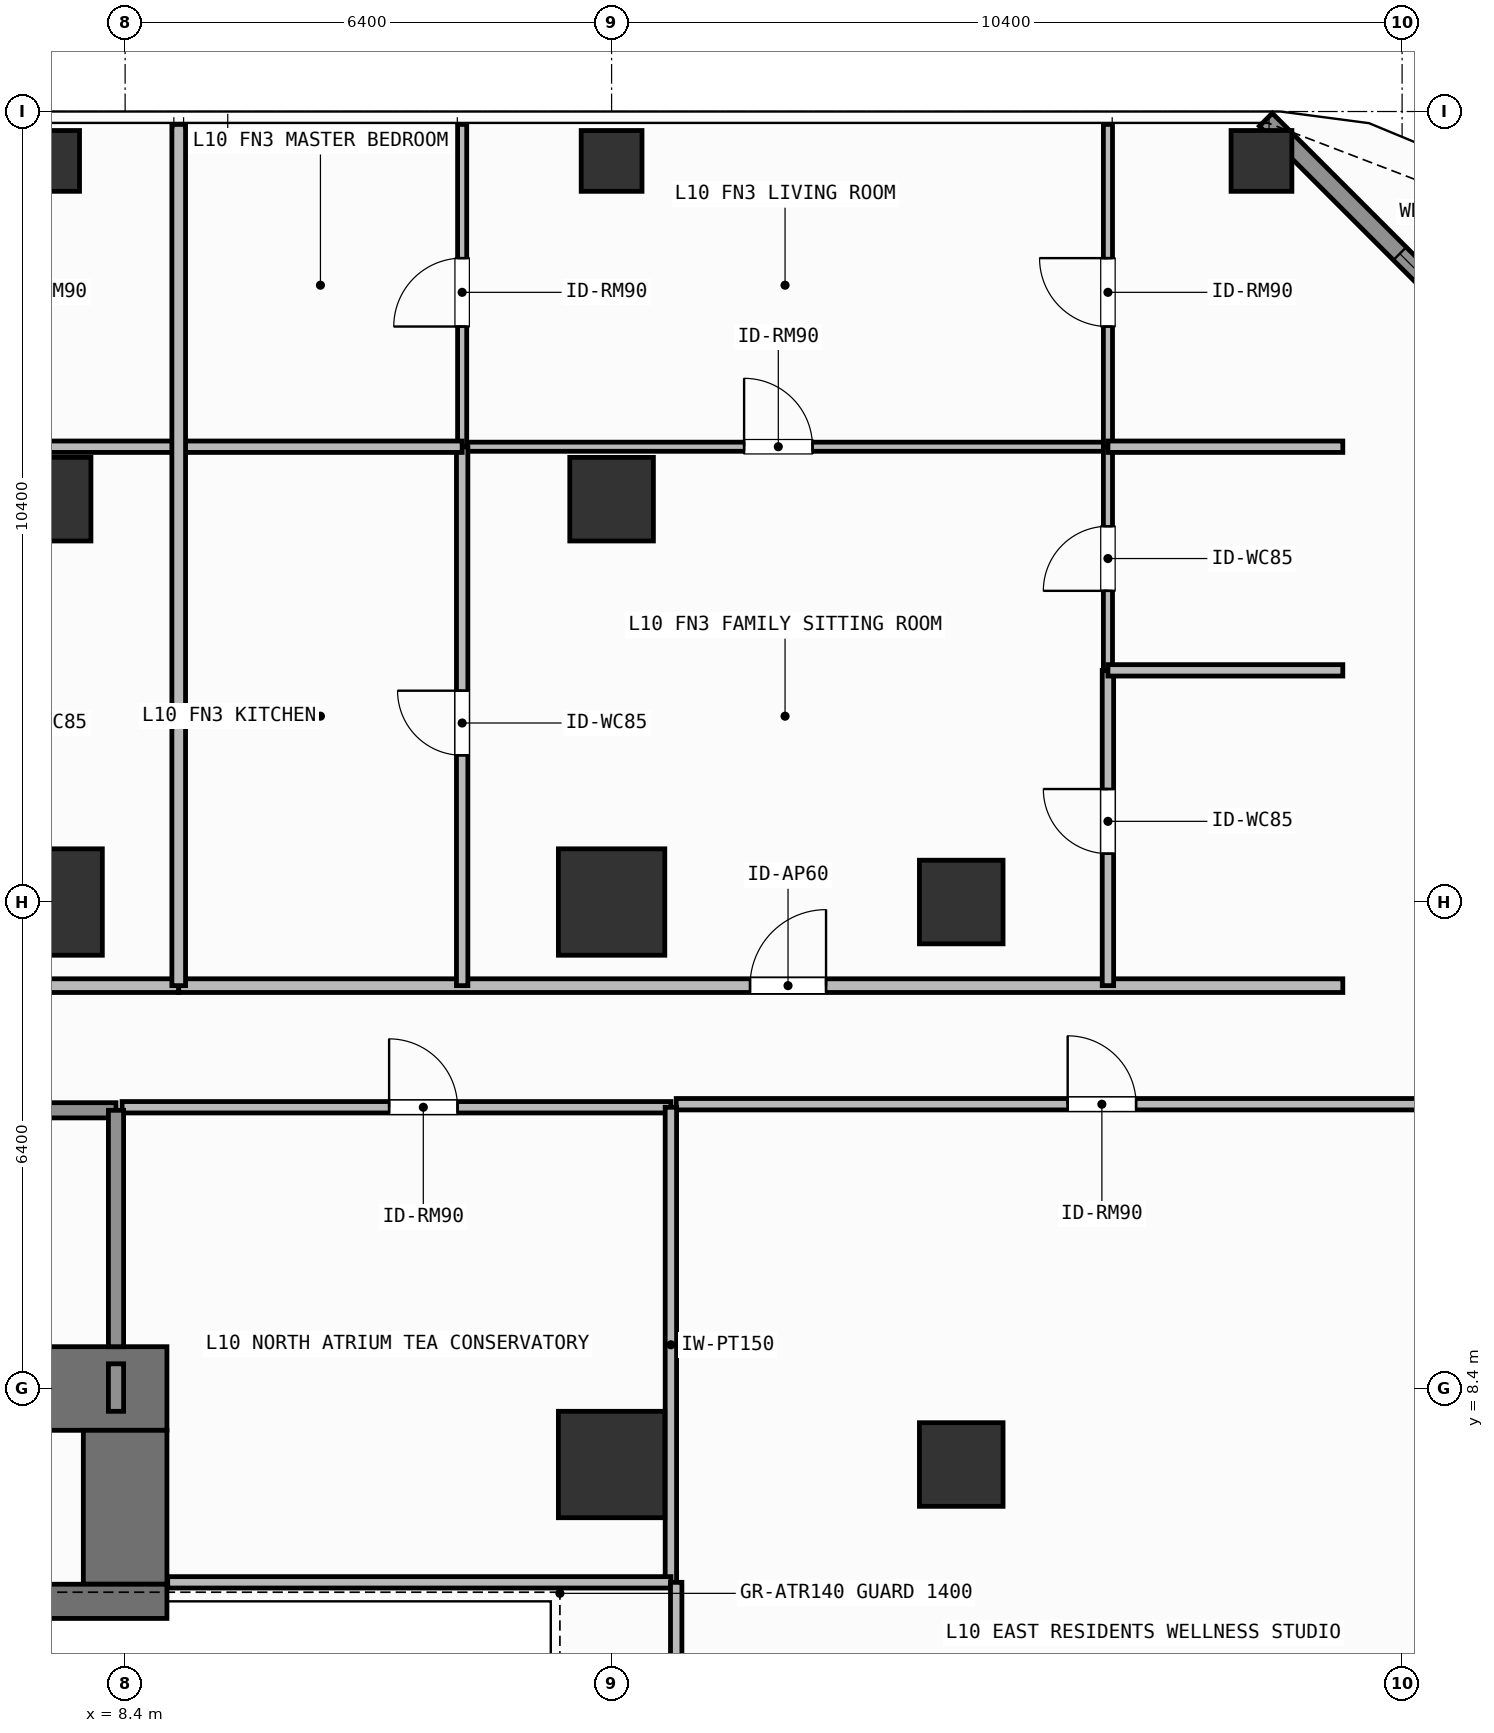
"""IFC4 building model, lengths in metres.
Left out: names, types, materials, properties, quantities, classifications, styles, units other than length and angle.
Written with IfcOpenShell. Run it as: python <this file> out.ifc"""

import sys

from ifc_helpers import new_model, si_unit, direction, frame, frame_2d, origin, origin_2d, place, context, subcontext, project, spatial, rectangle, hollow_rectangle, extrude, element, fill, save


model = new_model("IFC4")
c1 = context("Model", 3, precision=1e-05, world=origin(), true_north=direction((0.0, 1.0)))
c2 = subcontext(c1, "Body", "Model", "MODEL_VIEW")
j1 = project(units=[si_unit("LENGTHUNIT", "METRE"), si_unit("PLANEANGLEUNIT", "RADIAN")], contexts=[c1])
p1 = place(None, origin())
s1 = spatial("IfcSite", under=j1, at=p1, CompositionType="ELEMENT")
p2 = place(p1, origin())
s2 = spatial("IfcBuilding", under=s1, at=p2, CompositionType="ELEMENT")
p3 = place(p2, frame((0.0, 0.0, 38.4)))
s3 = spatial("IfcBuildingStorey", under=s2, at=p3, CompositionType="ELEMENT", Elevation=38.4)
p4 = place(p3, frame((-7.55, 8.4, 0.0), z_axis=(0.0, 0.0, 1.0), x_axis=(1.0, 0.0, 0.0)))
e1 = element("IfcWall", 1, at=p4, inside=s3, PredefinedType="SHEAR", context=c2, shape_type="SweptSolid", body=[
    extrude(rectangle(XDim=16.5, YDim=1.1, at=frame_2d((8.25, 0.0))), origin(), (0.0, 0.0, 1.0), 3.9),
])
p5 = place(p3, frame((8.4, 5.825, 0.0), z_axis=(0.0, 0.0, 1.0), x_axis=(0.0, 1.0, 0.0)))
e2 = element("IfcWall", 2, at=p5, inside=s3, PredefinedType="SHEAR", context=c2, shape_type="SweptSolid", body=[
    extrude(rectangle(XDim=2.025, YDim=1.1, at=frame_2d((1.013, 0.0))), origin(), (0.0, 0.0, 1.0), 3.9),
])
p6 = place(p3, frame((3.045, 5.6, 0.0), z_axis=(0.0, 0.0, 1.0), x_axis=(1.0, 0.0, 0.0)))
e3 = element("IfcWall", 3, at=p6, inside=s3, PredefinedType="SHEAR", context=c2, shape_type="SweptSolid", body=[
    extrude(rectangle(XDim=5.905, YDim=0.45, at=frame_2d((2.953, 0.0))), origin(), (0.0, 0.0, 1.0), 3.9),
])
for number, where, z_axis, x_axis in (
    (4, (7.4, 14.8, 0.0), (0.0, 0.0, 1.0), (1.0, 0.0, 0.0)),
    (5, (14.8, 14.8, 0.0), (0.0, 0.0, 1.0), (1.0, 0.0, 0.0)),
    (6, (14.8, 7.4, 0.0), (0.0, 0.0, 1.0), (1.0, 0.0, 0.0)),
):
    element("IfcColumn", number, at=place(p3, frame(where, z_axis=z_axis, x_axis=x_axis)), inside=s3, PredefinedType="COLUMN", context=c2, shape_type="SweptSolid", body=[
        extrude(rectangle(XDim=1.4, YDim=1.4, at=origin_2d()), origin(), (0.0, 0.0, 1.0), 3.9),
    ])
for number, where, z_axis, x_axis in (
    (7, (19.4, 7.4, 0.0), (0.0, 0.0, 1.0), (1.0, 0.0, 0.0)),
    (8, (19.4, 14.8, 0.0), (0.0, 0.0, 1.0), (1.0, 0.0, 0.0)),
    (9, (7.4, 20.1, 0.0), (0.0, 0.0, 1.0), (1.0, 0.0, 0.0)),
    (10, (14.8, 20.1, 0.0), (0.0, 0.0, 1.0), (1.0, 0.0, 0.0)),
):
    element("IfcColumn", number, at=place(p3, frame(where, z_axis=z_axis, x_axis=x_axis)), inside=s3, PredefinedType="COLUMN", context=c2, shape_type="SweptSolid", body=[
        extrude(rectangle(XDim=1.1, YDim=1.1, at=origin_2d()), origin(), (0.0, 0.0, 1.0), 3.9),
    ])
for number, where, z_axis, x_axis in (
    (11, (23.35, 24.55, 0.0), (0.0, 0.0, 1.0), (1.0, 0.0, 0.0)),
    (12, (7.4, 24.55, 0.0), (0.0, 0.0, 1.0), (1.0, 0.0, 0.0)),
    (13, (14.8, 24.55, 0.0), (0.0, 0.0, 1.0), (1.0, 0.0, 0.0)),
):
    element("IfcColumn", number, at=place(p3, frame(where, z_axis=z_axis, x_axis=x_axis)), inside=s3, PredefinedType="COLUMN", context=c2, shape_type="SweptSolid", body=[
        extrude(hollow_rectangle(XDim=0.8, YDim=0.8, WallThickness=0.036, at=origin_2d()), origin(), (0.0, 0.0, 1.0), 3.9),
    ])
p7 = place(p3, frame((23.408, 25.092, 0.0), z_axis=(0.0, 0.0, 1.0), x_axis=(0.707106781187, -0.707106781187, 0.0)))
e14 = element("IfcWall", 14, at=p7, inside=s3, PredefinedType="SOLIDWALL", context=c2, shape_type="SweptSolid", body=[
    extrude(rectangle(XDim=6.484, YDim=0.24, at=frame_2d((3.242, 0.0))), origin(), (0.0, 0.0, 1.0), 3.68),
])
p8 = place(p7, frame((2.492, 0.0, 0.8)))
e15 = element("IfcOpeningElement", 15, at=p8, cuts=e14, PredefinedType="OPENING", context=c2, shape_type="SweptSolid", body=[
    extrude(rectangle(XDim=1.5, YDim=1.85, at=frame_2d((0.75, 0.925))), frame((0.0, 0.13, 0.0), z_axis=(0.0, -1.0, 0.0), x_axis=(1.0, 0.0, 0.0)), (0.0, 0.0, 1.0), 0.26),
])
p9 = place(p3, frame((4.58, 12.06, 0.0), z_axis=(0.0, 0.0, 1.0), x_axis=(1.0, 0.0, 0.0)))
e16 = element("IfcWall", 16, at=p9, inside=s3, PredefinedType="SOLIDWALL", context=c2, shape_type="SweptSolid", body=[
    extrude(rectangle(XDim=3.7, YDim=0.2, at=frame_2d((1.85, 0.0))), origin(), (0.0, 0.0, 1.0), 3.68),
])
p10 = place(p9, frame((1.212, 0.0, 0.0)))
e17 = element("IfcOpeningElement", 17, at=p10, cuts=e16, PredefinedType="OPENING", context=c2, shape_type="SweptSolid", body=[
    extrude(rectangle(XDim=1.1, YDim=2.15, at=frame_2d((0.55, 1.075))), frame((0.0, 0.11, 0.0), z_axis=(0.0, -1.0, 0.0), x_axis=(1.0, 0.0, 0.0)), (0.0, 0.0, 1.0), 0.22),
])
p11 = place(p3, frame((8.36, 12.1, 0.0), z_axis=(0.0, 0.0, 1.0), x_axis=(1.0, 0.0, 0.0)))
e18 = element("IfcWall", 18, at=p11, inside=s3, PredefinedType="PARTITIONING", context=c2, shape_type="SweptSolid", body=[
    extrude(rectangle(XDim=7.22, YDim=0.15, at=frame_2d((3.61, 0.0))), origin(), (0.0, 0.0, 1.0), 3.68),
])
p12 = place(p11, frame((3.513, 0.0, 0.0)))
e19 = element("IfcOpeningElement", 19, at=p12, cuts=e18, PredefinedType="OPENING", context=c2, shape_type="SweptSolid", body=[
    extrude(rectangle(XDim=0.9, YDim=2.1, at=frame_2d((0.45, 1.05))), frame((0.0, 0.085, 0.0), z_axis=(0.0, -1.0, 0.0), x_axis=(1.0, 0.0, 0.0)), (0.0, 0.0, 1.0), 0.17),
])
p13 = place(p3, frame((-2.121, 13.7, 0.0), z_axis=(0.0, 0.0, 1.0), x_axis=(1.0, 0.0, 0.0)))
e20 = element("IfcWall", 20, at=p13, inside=s3, PredefinedType="PARTITIONING", context=c2, shape_type="SweptSolid", body=[
    extrude(rectangle(XDim=11.226, YDim=0.18, at=frame_2d((5.613, 0.0))), origin(), (0.0, 0.0, 1.0), 3.68),
])
p14 = place(p13, frame((5.29, 0.0, 0.0)))
e21 = element("IfcOpeningElement", 21, at=p14, cuts=e20, PredefinedType="OPENING", context=c2, shape_type="SweptSolid", body=[
    extrude(rectangle(XDim=1.0, YDim=2.2, at=frame_2d((0.5, 1.1))), frame((0.0, 0.1, 0.0), z_axis=(0.0, -1.0, 0.0), x_axis=(1.0, 0.0, 0.0)), (0.0, 0.0, 1.0), 0.2),
])
p15 = place(p3, frame((9.105, 13.7, 0.0), z_axis=(0.0, 0.0, 1.0), x_axis=(1.0, 0.0, 0.0)))
e22 = element("IfcWall", 22, at=p15, inside=s3, PredefinedType="PARTITIONING", context=c2, shape_type="SweptSolid", body=[
    extrude(rectangle(XDim=15.315, YDim=0.18, at=frame_2d((7.657, 0.0))), origin(), (0.0, 0.0, 1.0), 3.68),
])
p16 = place(p15, frame((7.516, 0.0, 0.0)))
e23 = element("IfcOpeningElement", 23, at=p16, cuts=e22, PredefinedType="OPENING", context=c2, shape_type="SweptSolid", body=[
    extrude(rectangle(XDim=1.0, YDim=2.2, at=frame_2d((0.5, 1.1))), frame((0.0, 0.1, 0.0), z_axis=(0.0, -1.0, 0.0), x_axis=(1.0, 0.0, 0.0)), (0.0, 0.0, 1.0), 0.2),
])
p17 = place(p3, frame((12.834, 20.79, 0.0), z_axis=(0.0, 0.0, 1.0), x_axis=(1.0, 0.0, 0.0)))
e24 = element("IfcWall", 24, at=p17, inside=s3, PredefinedType="PARTITIONING", context=c2, shape_type="SweptSolid", body=[
    extrude(rectangle(XDim=8.496, YDim=0.12, at=frame_2d((4.248, 0.0))), origin(), (0.0, 0.0, 1.0), 3.68),
])
p18 = place(p17, frame((3.709, 0.0, 0.0)))
e25 = element("IfcOpeningElement", 25, at=p18, cuts=e24, PredefinedType="OPENING", context=c2, shape_type="SweptSolid", body=[
    extrude(rectangle(XDim=0.9, YDim=2.1, at=frame_2d((0.45, 1.05))), frame((0.0, 0.07, 0.0), z_axis=(0.0, -1.0, 0.0), x_axis=(1.0, 0.0, 0.0)), (0.0, 0.0, 1.0), 0.14),
])
p19 = place(p3, frame((12.834, 13.7, 0.0), z_axis=(0.0, 0.0, 1.0), x_axis=(0.0, 1.0, 0.0)))
e26 = element("IfcWall", 26, at=p19, inside=s3, PredefinedType="PARTITIONING", context=c2, shape_type="SweptSolid", body=[
    extrude(rectangle(XDim=7.09, YDim=0.15, at=frame_2d((3.545, 0.0))), origin(), (0.0, 0.0, 1.0), 3.68),
])
p20 = place(p19, frame((3.03, 0.0, 0.0)))
e27 = element("IfcOpeningElement", 27, at=p20, cuts=e26, PredefinedType="OPENING", context=c2, shape_type="SweptSolid", body=[
    extrude(rectangle(XDim=0.85, YDim=2.1, at=frame_2d((0.425, 1.05))), frame((0.0, 0.085, 0.0), z_axis=(0.0, -1.0, 0.0), x_axis=(1.0, 0.0, 0.0)), (0.0, 0.0, 1.0), 0.17),
])
p21 = place(p3, frame((12.834, 20.79, 0.0), z_axis=(0.0, 0.0, 1.0), x_axis=(0.0, 1.0, 0.0)))
e28 = element("IfcWall", 28, at=p21, inside=s3, PredefinedType="PARTITIONING", context=c2, shape_type="SweptSolid", body=[
    extrude(rectangle(XDim=4.24, YDim=0.12, at=frame_2d((2.12, 0.0))), origin(), (0.0, 0.0, 1.0), 3.68),
])
p22 = place(p21, frame((1.581, 0.0, 0.0)))
e29 = element("IfcOpeningElement", 29, at=p22, cuts=e28, PredefinedType="OPENING", context=c2, shape_type="SweptSolid", body=[
    extrude(rectangle(XDim=0.9, YDim=2.1, at=frame_2d((0.45, 1.05))), frame((0.0, 0.07, 0.0), z_axis=(0.0, -1.0, 0.0), x_axis=(1.0, 0.0, 0.0)), (0.0, 0.0, 1.0), 0.14),
])
p23 = place(p3, frame((21.33, 13.7, 0.0), z_axis=(0.0, 0.0, 1.0), x_axis=(0.0, 1.0, 0.0)))
e30 = element("IfcWall", 30, at=p23, inside=s3, PredefinedType="PARTITIONING", context=c2, shape_type="SweptSolid", body=[
    extrude(rectangle(XDim=4.148, YDim=0.15, at=frame_2d((2.074, 0.0))), origin(), (0.0, 0.0, 1.0), 3.68),
])
p24 = place(p23, frame((1.737, 0.0, 0.0)))
e31 = element("IfcOpeningElement", 31, at=p24, cuts=e30, PredefinedType="OPENING", context=c2, shape_type="SweptSolid", body=[
    extrude(rectangle(XDim=0.85, YDim=2.1, at=frame_2d((0.425, 1.05))), frame((0.0, 0.085, 0.0), z_axis=(0.0, -1.0, 0.0), x_axis=(1.0, 0.0, 0.0)), (0.0, 0.0, 1.0), 0.17),
])
p25 = place(p3, frame((21.33, 17.848, 0.0), z_axis=(0.0, 0.0, 1.0), x_axis=(0.0, 1.0, 0.0)))
e32 = element("IfcWall", 32, at=p25, inside=s3, PredefinedType="PARTITIONING", context=c2, shape_type="SweptSolid", body=[
    extrude(rectangle(XDim=2.942, YDim=0.12, at=frame_2d((1.471, 0.0))), origin(), (0.0, 0.0, 1.0), 3.68),
])
p26 = place(p25, frame((1.046, 0.0, 0.0)))
e33 = element("IfcOpeningElement", 33, at=p26, cuts=e32, PredefinedType="OPENING", context=c2, shape_type="SweptSolid", body=[
    extrude(rectangle(XDim=0.85, YDim=2.1, at=frame_2d((0.425, 1.05))), frame((0.0, 0.07, 0.0), z_axis=(0.0, -1.0, 0.0), x_axis=(1.0, 0.0, 0.0)), (0.0, 0.0, 1.0), 0.14),
])
p27 = place(p3, frame((21.33, 20.79, 0.0), z_axis=(0.0, 0.0, 1.0), x_axis=(0.0, 1.0, 0.0)))
e34 = element("IfcWall", 34, at=p27, inside=s3, PredefinedType="PARTITIONING", context=c2, shape_type="SweptSolid", body=[
    extrude(rectangle(XDim=4.24, YDim=0.12, at=frame_2d((2.12, 0.0))), origin(), (0.0, 0.0, 1.0), 3.68),
])
p28 = place(p27, frame((1.581, 0.0, 0.0)))
e35 = element("IfcOpeningElement", 35, at=p28, cuts=e34, PredefinedType="OPENING", context=c2, shape_type="SweptSolid", body=[
    extrude(rectangle(XDim=0.9, YDim=2.1, at=frame_2d((0.45, 1.05))), frame((0.0, 0.07, 0.0), z_axis=(0.0, -1.0, 0.0), x_axis=(1.0, 0.0, 0.0)), (0.0, 0.0, 1.0), 0.14),
])
p29 = place(p3, frame((15.65, 12.14, 0.0), z_axis=(0.0, 0.0, 1.0), x_axis=(1.0, 0.0, 0.0)))
e36 = element("IfcWall", 36, at=p29, inside=s3, PredefinedType="PARTITIONING", context=c2, shape_type="SweptSolid", body=[
    extrude(rectangle(XDim=12.27, YDim=0.15, at=frame_2d((6.135, 0.0))), origin(), (0.0, 0.0, 1.0), 3.68),
])
p30 = place(p29, frame((5.15, 0.0, 0.0)))
e37 = element("IfcOpeningElement", 37, at=p30, cuts=e36, PredefinedType="OPENING", context=c2, shape_type="SweptSolid", body=[
    extrude(rectangle(XDim=0.9, YDim=2.1, at=frame_2d((0.45, 1.05))), frame((0.0, 0.085, 0.0), z_axis=(0.0, -1.0, 0.0), x_axis=(1.0, 0.0, 0.0)), (0.0, 0.0, 1.0), 0.17),
])
p31 = place(p3, frame((8.28, 8.95, 0.0), z_axis=(0.0, 0.0, 1.0), x_axis=(0.0, 1.0, 0.0)))
e38 = element("IfcWall", 38, at=p31, inside=s3, PredefinedType="SOLIDWALL", context=c2, shape_type="SweptSolid", body=[
    extrude(rectangle(XDim=3.11, YDim=0.2, at=frame_2d((1.555, 0.0))), origin(), (0.0, 0.0, 1.0), 3.68),
])
p32 = place(p3, frame((8.28, 8.1, 0.0), z_axis=(0.0, 0.0, 1.0), x_axis=(0.0, 1.0, 0.0)))
e39 = element("IfcWall", 39, at=p32, inside=s3, PredefinedType="SOLIDWALL", context=c2, shape_type="SweptSolid", body=[
    extrude(rectangle(XDim=0.625, YDim=0.2, at=frame_2d((0.312, 0.0))), origin(), (0.0, 0.0, 1.0), 3.68),
])
p33 = place(p3, frame((15.58, 5.85, 0.0), z_axis=(0.0, 0.0, 1.0), x_axis=(0.0, 1.0, 0.0)))
e40 = element("IfcWall", 40, at=p33, inside=s3, PredefinedType="PARTITIONING", context=c2, shape_type="SweptSolid", body=[
    extrude(rectangle(XDim=6.25, YDim=0.15, at=frame_2d((3.125, 0.0))), origin(), (0.0, 0.0, 1.0), 3.68),
])
p34 = place(p3, frame((8.96, 5.85, 0.0), z_axis=(0.0, 0.0, 1.0), x_axis=(1.0, 0.0, 0.0)))
e41 = element("IfcWall", 41, at=p34, inside=s3, PredefinedType="PARTITIONING", context=c2, shape_type="SweptSolid", body=[
    extrude(rectangle(XDim=6.62, YDim=0.15, at=frame_2d((3.31, 0.0))), origin(), (0.0, 0.0, 1.0), 3.68),
])
p35 = place(p3, frame((5.466, 20.79, 0.0), z_axis=(0.0, 0.0, 1.0), x_axis=(1.0, 0.0, 0.0)))
e42 = element("IfcWall", 42, at=p35, inside=s3, PredefinedType="PARTITIONING", context=c2, shape_type="SweptSolid", body=[
    extrude(rectangle(XDim=3.639, YDim=0.15, at=frame_2d((1.819, 0.0))), origin(), (0.0, 0.0, 1.0), 3.68),
])
p36 = place(p3, frame((9.105, 20.79, 0.0), z_axis=(0.0, 0.0, 1.0), x_axis=(1.0, 0.0, 0.0)))
e43 = element("IfcWall", 43, at=p36, inside=s3, PredefinedType="PARTITIONING", context=c2, shape_type="SweptSolid", body=[
    extrude(rectangle(XDim=3.729, YDim=0.15, at=frame_2d((1.865, 0.0))), origin(), (0.0, 0.0, 1.0), 3.68),
])
for number, where, z_axis, x_axis in (
    (44, (21.33, 17.848, 0.0), (0.0, 0.0, 1.0), (1.0, 0.0, 0.0)),
    (45, (21.33, 20.79, 0.0), (0.0, 0.0, 1.0), (1.0, 0.0, 0.0)),
):
    element("IfcWall", number, at=place(p3, frame(where, z_axis=z_axis, x_axis=x_axis)), inside=s3, PredefinedType="PARTITIONING", context=c2, shape_type="SweptSolid", body=[
        extrude(rectangle(XDim=3.09, YDim=0.15, at=frame_2d((1.545, 0.0))), origin(), (0.0, 0.0, 1.0), 3.68),
    ])
p37 = place(p3, frame((9.105, 13.7, 0.0), z_axis=(0.0, 0.0, 1.0), x_axis=(0.0, 1.0, 0.0)))
e46 = element("IfcWall", 46, at=p37, inside=s3, PredefinedType="PARTITIONING", context=c2, shape_type="SweptSolid", body=[
    extrude(rectangle(XDim=11.33, YDim=0.18, at=frame_2d((5.665, 0.0))), origin(), (0.0, 0.0, 1.0), 3.68),
])
p38 = place(p3, frame((15.65, -1.8, 0.0), z_axis=(0.0, 0.0, 1.0), x_axis=(0.0, 1.0, 0.0)))
e47 = element("IfcWall", 47, at=p38, inside=s3, PredefinedType="PARTITIONING", context=c2, shape_type="SweptSolid", body=[
    extrude(rectangle(XDim=7.65, YDim=0.15, at=frame_2d((3.825, 0.0))), origin(), (0.0, 0.0, 1.0), 3.68),
])
p39 = place(p8, origin())
e48 = element("IfcWindow", 48, at=p39, inside=s3, PartitioningType="SINGLE_PANEL", PredefinedType="WINDOW", context=c2, shape_type="SweptSolid", body=[
    extrude(rectangle(XDim=1.5, YDim=1.85, at=frame_2d((0.75, 0.925))), frame((0.0, 0.03, 0.0), z_axis=(0.0, -1.0, 0.0), x_axis=(1.0, 0.0, 0.0)), (0.0, 0.0, 1.0), 0.06),
])
fill(e15, e48)
p40 = place(p12, origin())
e49 = element("IfcDoor", 49, at=p40, inside=s3, OperationType="SINGLE_SWING_LEFT", PredefinedType="DOOR", context=c2, shape_type="SweptSolid", body=[
    extrude(rectangle(XDim=0.9, YDim=2.1, at=frame_2d((0.45, 1.05))), frame((0.0, 0.025, 0.0), z_axis=(0.0, -1.0, 0.0), x_axis=(1.0, 0.0, 0.0)), (0.0, 0.0, 1.0), 0.05),
])
fill(e19, e49)
p41 = place(p16, origin())
e50 = element("IfcDoor", 50, at=p41, inside=s3, OperationType="SINGLE_SWING_RIGHT", PredefinedType="DOOR", context=c2, shape_type="SweptSolid", body=[
    extrude(rectangle(XDim=1.0, YDim=2.2, at=frame_2d((0.5, 1.1))), frame((0.0, 0.025, 0.0), z_axis=(0.0, -1.0, 0.0), x_axis=(1.0, 0.0, 0.0)), (0.0, 0.0, 1.0), 0.05),
])
fill(e23, e50)
p42 = place(p18, origin())
e51 = element("IfcDoor", 51, at=p42, inside=s3, OperationType="SINGLE_SWING_LEFT", PredefinedType="DOOR", context=c2, shape_type="SweptSolid", body=[
    extrude(rectangle(XDim=0.9, YDim=2.1, at=frame_2d((0.45, 1.05))), frame((0.0, 0.025, 0.0), z_axis=(0.0, -1.0, 0.0), x_axis=(1.0, 0.0, 0.0)), (0.0, 0.0, 1.0), 0.05),
])
fill(e25, e51)
p43 = place(p20, origin())
e52 = element("IfcDoor", 52, at=p43, inside=s3, OperationType="SINGLE_SWING_RIGHT", PredefinedType="DOOR", context=c2, shape_type="SweptSolid", body=[
    extrude(rectangle(XDim=0.85, YDim=2.1, at=frame_2d((0.425, 1.05))), frame((0.0, 0.025, 0.0), z_axis=(0.0, -1.0, 0.0), x_axis=(1.0, 0.0, 0.0)), (0.0, 0.0, 1.0), 0.05),
])
fill(e27, e52)
p44 = place(p22, origin())
e53 = element("IfcDoor", 53, at=p44, inside=s3, OperationType="SINGLE_SWING_LEFT", PredefinedType="DOOR", context=c2, shape_type="SweptSolid", body=[
    extrude(rectangle(XDim=0.9, YDim=2.1, at=frame_2d((0.45, 1.05))), frame((0.0, 0.025, 0.0), z_axis=(0.0, -1.0, 0.0), x_axis=(1.0, 0.0, 0.0)), (0.0, 0.0, 1.0), 0.05),
])
fill(e29, e53)
p45 = place(p24, origin())
e54 = element("IfcDoor", 54, at=p45, inside=s3, OperationType="SINGLE_SWING_RIGHT", PredefinedType="DOOR", context=c2, shape_type="SweptSolid", body=[
    extrude(rectangle(XDim=0.85, YDim=2.1, at=frame_2d((0.425, 1.05))), frame((0.0, 0.025, 0.0), z_axis=(0.0, -1.0, 0.0), x_axis=(1.0, 0.0, 0.0)), (0.0, 0.0, 1.0), 0.05),
])
fill(e31, e54)
p46 = place(p26, origin())
e55 = element("IfcDoor", 55, at=p46, inside=s3, OperationType="SINGLE_SWING_LEFT", PredefinedType="DOOR", context=c2, shape_type="SweptSolid", body=[
    extrude(rectangle(XDim=0.85, YDim=2.1, at=frame_2d((0.425, 1.05))), frame((0.0, 0.025, 0.0), z_axis=(0.0, -1.0, 0.0), x_axis=(1.0, 0.0, 0.0)), (0.0, 0.0, 1.0), 0.05),
])
fill(e33, e55)
p47 = place(p28, origin())
e56 = element("IfcDoor", 56, at=p47, inside=s3, OperationType="SINGLE_SWING_RIGHT", PredefinedType="DOOR", context=c2, shape_type="SweptSolid", body=[
    extrude(rectangle(XDim=0.9, YDim=2.1, at=frame_2d((0.45, 1.05))), frame((0.0, 0.025, 0.0), z_axis=(0.0, -1.0, 0.0), x_axis=(1.0, 0.0, 0.0)), (0.0, 0.0, 1.0), 0.05),
])
fill(e35, e56)
p48 = place(p30, origin())
e57 = element("IfcDoor", 57, at=p48, inside=s3, OperationType="SINGLE_SWING_LEFT", PredefinedType="DOOR", context=c2, shape_type="SweptSolid", body=[
    extrude(rectangle(XDim=0.9, YDim=2.1, at=frame_2d((0.45, 1.05))), frame((0.0, 0.025, 0.0), z_axis=(0.0, -1.0, 0.0), x_axis=(1.0, 0.0, 0.0)), (0.0, 0.0, 1.0), 0.05),
])
fill(e37, e57)
save(model, sys.argv[1])
